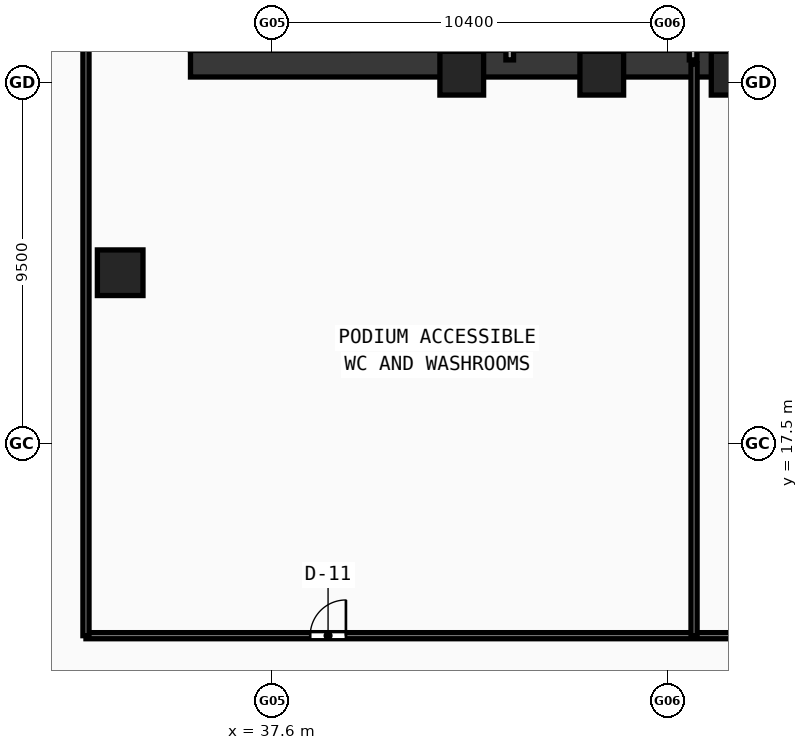
"""IFC4 building model, lengths in metres.
Left out: names, types, materials, properties, quantities, classifications, styles, units other than length and angle.
Written with IfcOpenShell. Run it as: python <this file> out.ifc"""

import sys

from ifc_helpers import new_model, si_unit, direction, frame, frame_2d, origin, origin_with_axes, origin_2d, place, context, subcontext, project, spatial, rectangle, hollow_rectangle, extrude, source, transform, mapped, element, fill, save


model = new_model("IFC4")
c1 = context("Model", 3, precision=1e-05, world=origin(), true_north=direction((0.0, 1.0)))
c2 = subcontext(c1, "Body", "Model", "MODEL_VIEW")
j1 = project(units=[si_unit("LENGTHUNIT", "METRE"), si_unit("PLANEANGLEUNIT", "RADIAN")], contexts=[c1])
p1 = place(None, origin())
s1 = spatial("IfcSite", under=j1, at=p1, CompositionType="ELEMENT")
p2 = place(p1, origin())
s2 = spatial("IfcBuilding", under=s1, at=p2, CompositionType="ELEMENT")
p3 = place(p2, frame((0.0, 0.0, 19.2)))
s3 = spatial("IfcBuildingStorey", under=s2, at=p3, CompositionType="ELEMENT", Elevation=19.2)
p4 = place(p3, frame((35.45, 27.5, 0.0), z_axis=(0.0, 0.0, 1.0), x_axis=(1.0, 0.0, 0.0)))
e1 = element("IfcWall", 1, at=p4, inside=s3, PredefinedType="SHEAR", context=c2, shape_type="SweptSolid", body=[
    extrude(rectangle(XDim=25.1, YDim=0.7, at=frame_2d((12.55, 0.0))), origin(), (0.0, 0.0, 1.0), 5.92),
])
m1 = source(origin(), c2, "Body", "SweptSolid", [
    extrude(hollow_rectangle(XDim=1.15, YDim=1.15, WallThickness=0.048, at=origin_2d()), origin(), (0.0, 0.0, 1.0), 6.2),
])
for number, where, z_axis, x_axis in (
    (2, (42.588, 27.25, -0.28), (0.0, 0.0, 1.0), (1.0, 0.0, 0.0)),
    (3, (46.272, 27.25, -0.28), (0.0, 0.0, 1.0), (1.0, 0.0, 0.0)),
    (4, (49.729, 27.25, -0.28), (0.0, 0.0, 1.0), (1.0, 0.0, 0.0)),
):
    element("IfcColumn", number, at=place(p3, frame(where, z_axis=z_axis, x_axis=x_axis)), inside=s3, PredefinedType="COLUMN", context=c2, shape_type="MappedRepresentation", body=[
        mapped(m1, transform((0.0, 0.0, 0.0), scale=1.0)),
    ])
m2 = source(origin(), c2, "Body", "SweptSolid", [
    extrude(hollow_rectangle(XDim=1.2, YDim=1.2, WallThickness=0.05, at=origin_2d()), origin(), (0.0, 0.0, 1.0), 6.2),
])
p5 = place(p3, frame((33.6, 22.0, -0.28), z_axis=(0.0, 0.0, 1.0), x_axis=(1.0, 0.0, 0.0)))
e5 = element("IfcColumn", 5, at=p5, inside=s3, PredefinedType="COLUMN", context=c2, shape_type="MappedRepresentation", body=[
    mapped(m2, transform((0.0, 0.0, 0.0), scale=1.0)),
])
p6 = place(p3, frame((43.85, 27.6, 0.0), z_axis=(0.0, 0.0, 1.0), x_axis=(0.0, 1.0, 0.0)))
e6 = element("IfcWall", 6, at=p6, inside=s3, PredefinedType="SOLIDWALL", context=c2, shape_type="SweptSolid", body=[
    extrude(rectangle(XDim=6.22, YDim=0.2, at=frame_2d((3.11, 0.0))), origin(), (0.0, 0.0, 1.0), 5.92),
])
p7 = place(p6, frame((2.25, 0.0, 0.0)))
e7 = element("IfcOpeningElement", 7, at=p7, cuts=e6, PredefinedType="OPENING", context=c2, shape_type="SweptSolid", body=[
    extrude(rectangle(XDim=1.05, YDim=2.1, at=frame_2d((0.525, 1.05))), frame((0.0, 0.11, 0.0), z_axis=(0.0, -1.0, 0.0), x_axis=(1.0, 0.0, 0.0)), (0.0, 0.0, 1.0), 0.22),
])
p8 = place(p3, frame((46.225, 27.6, 0.0), z_axis=(0.0, 0.0, 1.0), x_axis=(0.0, 1.0, 0.0)))
e8 = element("IfcWall", 8, at=p8, inside=s3, PredefinedType="SOLIDWALL", context=c2, shape_type="SweptSolid", body=[
    extrude(rectangle(XDim=2.12, YDim=0.2, at=frame_2d((1.06, 0.0))), origin(), (0.0, 0.0, 1.0), 2.42),
])
p9 = place(p3, frame((48.675, 27.6, 0.0), z_axis=(0.0, 0.0, 1.0), x_axis=(0.0, 1.0, 0.0)))
e9 = element("IfcWall", 9, at=p9, inside=s3, PredefinedType="SOLIDWALL", context=c2, shape_type="SweptSolid", body=[
    extrude(rectangle(XDim=2.12, YDim=0.2, at=frame_2d((1.06, 0.0))), origin(), (0.0, 0.0, 1.0), 5.92),
])
p10 = place(p3, frame((42.32, 27.6, 0.0), z_axis=(0.0, 0.0, 1.0), x_axis=(0.0, 1.0, 0.0)))
e10 = element("IfcWall", 10, at=p10, inside=s3, PredefinedType="PARTITIONING", context=c2, shape_type="SweptSolid", body=[
    extrude(rectangle(XDim=5.9, YDim=0.16, at=frame_2d((2.95, 0.0))), origin(), (0.0, 0.0, 1.0), 2.42),
])
p11 = place(p10, frame((1.4, 0.0, 0.0)))
e11 = element("IfcOpeningElement", 11, at=p11, cuts=e10, PredefinedType="OPENING", context=c2, shape_type="SweptSolid", body=[
    extrude(rectangle(XDim=0.9, YDim=2.1, at=frame_2d((0.45, 1.05))), frame((0.0, 0.09, 0.0), z_axis=(0.0, -1.0, 0.0), x_axis=(1.0, 0.0, 0.0)), (0.0, 0.0, 1.0), 0.18),
])
p12 = place(p10, frame((4.45, 0.0, 0.0)))
e12 = element("IfcOpeningElement", 12, at=p12, cuts=e10, PredefinedType="OPENING", context=c2, shape_type="SweptSolid", body=[
    extrude(rectangle(XDim=0.9, YDim=2.1, at=frame_2d((0.45, 1.05))), frame((0.0, 0.09, 0.0), z_axis=(0.0, -1.0, 0.0), x_axis=(1.0, 0.0, 0.0)), (0.0, 0.0, 1.0), 0.18),
])
p13 = place(p3, frame((32.7, 12.45, 0.0), z_axis=(0.0, 0.0, 1.0), x_axis=(1.0, 0.0, 0.0)))
e13 = element("IfcWall", 13, at=p13, inside=s3, PredefinedType="PARTITIONING", context=c2, shape_type="SweptSolid", body=[
    extrude(rectangle(XDim=30.6, YDim=0.16, at=frame_2d((15.3, 0.0))), origin(), (0.0, 0.0, 1.0), 2.42),
])
p14 = place(p13, frame((19.0, 0.0, 0.0)))
e14 = element("IfcOpeningElement", 14, at=p14, cuts=e13, PredefinedType="OPENING", context=c2, shape_type="SweptSolid", body=[
    extrude(rectangle(XDim=0.92, YDim=2.1, at=frame_2d((0.46, 1.05))), frame((0.0, 0.09, 0.0), z_axis=(0.0, -1.0, 0.0), x_axis=(1.0, 0.0, 0.0)), (0.0, 0.0, 1.0), 0.18),
])
p15 = place(p13, frame((5.9, 0.0, 0.0)))
e15 = element("IfcOpeningElement", 15, at=p15, cuts=e13, PredefinedType="OPENING", context=c2, shape_type="SweptSolid", body=[
    extrude(rectangle(XDim=0.94, YDim=2.1, at=frame_2d((0.47, 1.05))), frame((0.0, 0.09, 0.0), z_axis=(0.0, -1.0, 0.0), x_axis=(1.0, 0.0, 0.0)), (0.0, 0.0, 1.0), 0.18),
])
p16 = place(p3, frame((32.7, 12.45, 0.0), z_axis=(0.0, 0.0, 1.0), x_axis=(0.0, 1.0, 0.0)))
e16 = element("IfcWall", 16, at=p16, inside=s3, PredefinedType="PARTITIONING", context=c2, shape_type="SweptSolid", body=[
    extrude(rectangle(XDim=26.75, YDim=0.16, at=frame_2d((13.375, 0.0))), origin(), (0.0, 0.0, 1.0), 2.42),
])
p17 = place(p3, frame((48.7, 12.45, 0.0), z_axis=(0.0, 0.0, 1.0), x_axis=(0.0, 1.0, 0.0)))
e17 = element("IfcWall", 17, at=p17, inside=s3, PredefinedType="PARTITIONING", context=c2, shape_type="SweptSolid", body=[
    extrude(rectangle(XDim=15.05, YDim=0.16, at=frame_2d((7.525, 0.0))), origin(), (0.0, 0.0, 1.0), 5.22),
])
m3 = source(origin(), c2, "Body", "SweptSolid", [
    extrude(rectangle(XDim=0.94, YDim=2.1, at=frame_2d((0.47, 1.05))), frame((0.0, 0.025, 0.0), z_axis=(0.0, -1.0, 0.0), x_axis=(1.0, 0.0, 0.0)), (0.0, 0.0, 1.0), 0.05),
])
p18 = place(p15, origin_with_axes())
e18 = element("IfcDoor", 18, at=p18, inside=s3, OperationType="SINGLE_SWING_RIGHT", PredefinedType="DOOR", context=c2, shape_type="MappedRepresentation", body=[
    mapped(m3, transform((0.0, 0.0, 0.0), scale=1.0)),
])
fill(e15, e18)
save(model, sys.argv[1])
